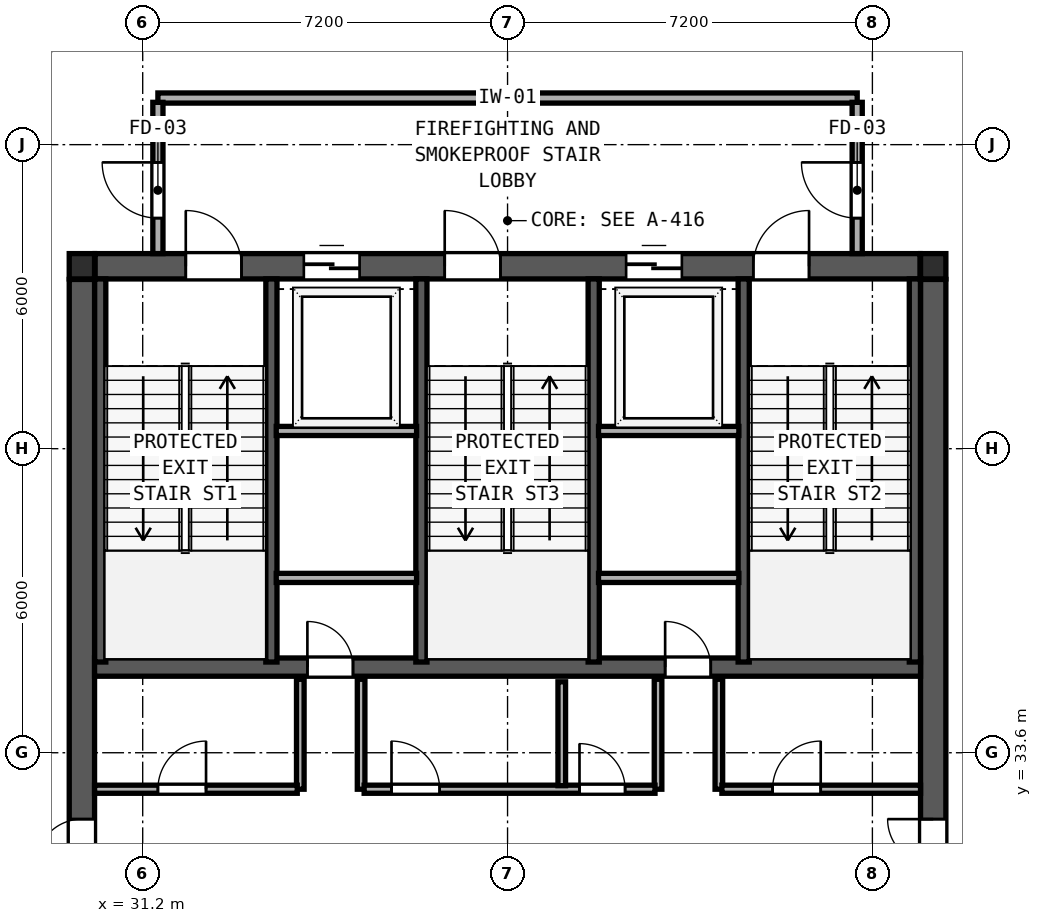
"""IFC4 building model, lengths in metres.
Left out: names, types, materials, properties, quantities, classifications, styles, units other than length and angle.
Written with IfcOpenShell. Run it as: python <this file> out.ifc"""

import sys

from ifc_helpers import new_model, si_unit, direction, frame, frame_2d, origin, origin_2d, place, context, subcontext, project, spatial, rectangle, hollow_rectangle, extrude, element, fill, save


model = new_model("IFC4")
c1 = context("Model", 3, precision=1e-05, world=origin(), true_north=direction((0.0, 1.0)))
c2 = subcontext(c1, "Body", "Model", "MODEL_VIEW")
j1 = project(units=[si_unit("LENGTHUNIT", "METRE"), si_unit("PLANEANGLEUNIT", "RADIAN")], contexts=[c1])
p1 = place(None, origin())
s1 = spatial("IfcSite", under=j1, at=p1, CompositionType="ELEMENT")
p2 = place(p1, origin())
s2 = spatial("IfcBuilding", under=s1, at=p2, CompositionType="ELEMENT")
p3 = place(p2, frame((0.0, 0.0, 328.2)))
s3 = spatial("IfcBuildingStorey", under=s2, at=p3, CompositionType="ELEMENT", Elevation=328.2)
p4 = place(p3, frame((30.26, 43.2, 0.0), z_axis=(0.0, 0.0, 1.0), x_axis=(1.0, 0.0, 0.0)))
e1 = element("IfcWall", 1, at=p4, inside=s3, PredefinedType="SHEAR", context=c2, shape_type="SweptSolid", body=[
    extrude(rectangle(XDim=16.28, YDim=0.5, at=frame_2d((8.14, 0.0))), origin(), (0.0, 0.0, 1.0), 4.55),
])
p5 = place(p4, frame((1.79, 0.0, 0.0)))
e2 = element("IfcOpeningElement", 2, at=p5, cuts=e1, PredefinedType="OPENING", context=c2, shape_type="SweptSolid", body=[
    extrude(rectangle(XDim=1.1, YDim=2.15, at=frame_2d((0.55, 1.075))), frame((0.0, 0.26, 0.0), z_axis=(0.0, -1.0, 0.0), x_axis=(1.0, 0.0, 0.0)), (0.0, 0.0, 1.0), 0.52),
])
p6 = place(p4, frame((6.9, 0.0, 0.0)))
e3 = element("IfcOpeningElement", 3, at=p6, cuts=e1, PredefinedType="OPENING", context=c2, shape_type="SweptSolid", body=[
    extrude(rectangle(XDim=1.1, YDim=2.15, at=frame_2d((0.55, 1.075))), frame((0.0, 0.26, 0.0), z_axis=(0.0, -1.0, 0.0), x_axis=(1.0, 0.0, 0.0)), (0.0, 0.0, 1.0), 0.52),
])
p7 = place(p4, frame((12.99, 0.0, 0.0)))
e4 = element("IfcOpeningElement", 4, at=p7, cuts=e1, PredefinedType="OPENING", context=c2, shape_type="SweptSolid", body=[
    extrude(rectangle(XDim=1.1, YDim=2.15, at=frame_2d((0.55, 1.075))), frame((0.0, 0.26, 0.0), z_axis=(0.0, -1.0, 0.0), x_axis=(1.0, 0.0, 0.0)), (0.0, 0.0, 1.0), 0.52),
])
p8 = place(p4, frame((4.12, 0.0, 0.0)))
e5 = element("IfcOpeningElement", 5, at=p8, cuts=e1, PredefinedType="OPENING", context=c2, shape_type="SweptSolid", body=[
    extrude(rectangle(XDim=1.1, YDim=2.2, at=frame_2d((0.55, 1.1))), frame((0.0, 0.26, 0.0), z_axis=(0.0, -1.0, 0.0), x_axis=(1.0, 0.0, 0.0)), (0.0, 0.0, 1.0), 0.52),
])
p9 = place(p4, frame((10.48, 0.0, 0.0)))
e6 = element("IfcOpeningElement", 6, at=p9, cuts=e1, PredefinedType="OPENING", context=c2, shape_type="SweptSolid", body=[
    extrude(rectangle(XDim=1.1, YDim=2.2, at=frame_2d((0.55, 1.1))), frame((0.0, 0.26, 0.0), z_axis=(0.0, -1.0, 0.0), x_axis=(1.0, 0.0, 0.0)), (0.0, 0.0, 1.0), 0.52),
])
p10 = place(p3, frame((30.0, 26.66, 0.0), z_axis=(0.0, 0.0, 1.0), x_axis=(0.0, 1.0, 0.0)))
e7 = element("IfcWall", 7, at=p10, inside=s3, PredefinedType="SHEAR", context=c2, shape_type="SweptSolid", body=[
    extrude(rectangle(XDim=16.28, YDim=0.5, at=frame_2d((8.14, 0.0))), origin(), (0.0, 0.0, 1.0), 4.55),
])
p11 = place(p10, frame((4.73, 0.0, 0.0)))
e8 = element("IfcOpeningElement", 8, at=p11, cuts=e7, PredefinedType="OPENING", context=c2, shape_type="SweptSolid", body=[
    extrude(rectangle(XDim=0.9, YDim=2.1, at=frame_2d((0.45, 1.05))), frame((0.0, 0.26, 0.0), z_axis=(0.0, -1.0, 0.0), x_axis=(1.0, 0.0, 0.0)), (0.0, 0.0, 1.0), 0.52),
])
p12 = place(p3, frame((46.8, 26.66, 0.0), z_axis=(0.0, 0.0, 1.0), x_axis=(0.0, 1.0, 0.0)))
e9 = element("IfcWall", 9, at=p12, inside=s3, PredefinedType="SHEAR", context=c2, shape_type="SweptSolid", body=[
    extrude(rectangle(XDim=16.28, YDim=0.5, at=frame_2d((8.14, 0.0))), origin(), (0.0, 0.0, 1.0), 4.55),
])
p13 = place(p12, frame((5.63, 0.0, 0.0), z_axis=(0.0, 0.0, 1.0), x_axis=(-1.0, 0.0, 0.0)))
e10 = element("IfcOpeningElement", 10, at=p13, cuts=e9, PredefinedType="OPENING", context=c2, shape_type="SweptSolid", body=[
    extrude(rectangle(XDim=0.9, YDim=2.1, at=frame_2d((0.45, 1.05))), frame((0.0, 0.26, 0.0), z_axis=(0.0, -1.0, 0.0), x_axis=(1.0, 0.0, 0.0)), (0.0, 0.0, 1.0), 0.52),
])
p14 = place(p12, frame((1.45, 0.0, 0.0), z_axis=(0.0, 0.0, 1.0), x_axis=(-1.0, 0.0, 0.0)))
e11 = element("IfcOpeningElement", 11, at=p14, cuts=e9, PredefinedType="OPENING", context=c2, shape_type="SweptSolid", body=[
    extrude(rectangle(XDim=0.9, YDim=2.1, at=frame_2d((0.45, 1.05))), frame((0.0, 0.26, 0.0), z_axis=(0.0, -1.0, 0.0), x_axis=(1.0, 0.0, 0.0)), (0.0, 0.0, 1.0), 0.52),
])
p15 = place(p3, frame((30.25, 35.29, 0.0), z_axis=(0.0, 0.0, 1.0), x_axis=(1.0, 0.0, 0.0)))
e12 = element("IfcWall", 12, at=p15, inside=s3, PredefinedType="SHEAR", context=c2, shape_type="SweptSolid", body=[
    extrude(rectangle(XDim=16.3, YDim=0.36, at=frame_2d((8.15, 0.0))), origin(), (0.0, 0.0, 1.0), 4.55),
])
p16 = place(p15, frame((5.1, 0.0, 0.0), z_axis=(0.0, 0.0, 1.0), x_axis=(-1.0, 0.0, 0.0)))
e13 = element("IfcOpeningElement", 13, at=p16, cuts=e12, PredefinedType="OPENING", context=c2, shape_type="SweptSolid", body=[
    extrude(rectangle(XDim=0.9, YDim=2.1, at=frame_2d((0.45, 1.05))), frame((0.0, 0.19, 0.0), z_axis=(0.0, -1.0, 0.0), x_axis=(1.0, 0.0, 0.0)), (0.0, 0.0, 1.0), 0.38),
])
p17 = place(p15, frame((12.16, 0.0, 0.0), z_axis=(0.0, 0.0, 1.0), x_axis=(-1.0, 0.0, 0.0)))
e14 = element("IfcOpeningElement", 14, at=p17, cuts=e12, PredefinedType="OPENING", context=c2, shape_type="SweptSolid", body=[
    extrude(rectangle(XDim=0.9, YDim=2.1, at=frame_2d((0.45, 1.05))), frame((0.0, 0.19, 0.0), z_axis=(0.0, -1.0, 0.0), x_axis=(1.0, 0.0, 0.0)), (0.0, 0.0, 1.0), 0.38),
])
for number, where, z_axis, x_axis in (
    (15, (30.362, 35.39, 0.0), (0.0, 0.0, 1.0), (0.0, 1.0, 0.0)),
    (16, (33.74, 35.39, 0.0), (0.0, 0.0, 1.0), (0.0, 1.0, 0.0)),
    (17, (36.7, 35.39, 0.0), (0.0, 0.0, 1.0), (0.0, 1.0, 0.0)),
    (18, (40.1, 35.39, 0.0), (0.0, 0.0, 1.0), (0.0, 1.0, 0.0)),
    (19, (43.06, 35.39, 0.0), (0.0, 0.0, 1.0), (0.0, 1.0, 0.0)),
    (20, (46.438, 35.39, 0.0), (0.0, 0.0, 1.0), (0.0, 1.0, 0.0)),
):
    element("IfcWall", number, at=place(p3, frame(where, z_axis=z_axis, x_axis=x_axis)), inside=s3, PredefinedType="SHEAR", context=c2, shape_type="SweptSolid", body=[
        extrude(rectangle(XDim=7.56, YDim=0.22, at=frame_2d((3.78, 0.0))), origin(), (0.0, 0.0, 1.0), 4.55),
    ])
for number, where, z_axis, x_axis in (
    (21, (30.0, 43.2, 0.0), (0.0, 0.0, 1.0), (1.0, 0.0, 0.0)),
    (22, (46.8, 43.2, 0.0), (0.0, 0.0, 1.0), (1.0, 0.0, 0.0)),
):
    element("IfcColumn", number, at=place(p3, frame(where, z_axis=z_axis, x_axis=x_axis)), inside=s3, PredefinedType="COLUMN", context=c2, shape_type="SweptSolid", body=[
        extrude(hollow_rectangle(XDim=0.5, YDim=0.5, WallThickness=0.02, at=origin_2d()), origin(), (0.0, 0.0, 1.0), 4.8),
    ])
p18 = place(p3, frame((32.098, 49.636, 0.0), z_axis=(0.0, 0.0, 1.0), x_axis=(-0.800012904983, -0.59998279297, 0.0)))
e23 = element("IfcWall", 23, at=p18, inside=s3, PredefinedType="SOLIDWALL", context=c2, shape_type="SweptSolid", body=[
    extrude(rectangle(XDim=4.54, YDim=0.22, at=frame_2d((2.27, 0.0))), origin(), (0.0, 0.0, 1.0), 4.55),
])
p19 = place(p3, frame((31.5, 46.52, 0.0), z_axis=(0.0, 0.0, 1.0), x_axis=(1.0, 0.0, 0.0)))
e24 = element("IfcWall", 24, at=p19, inside=s3, PredefinedType="SOLIDWALL", context=c2, shape_type="SweptSolid", body=[
    extrude(rectangle(XDim=13.8, YDim=0.2, at=frame_2d((6.9, 0.0))), origin(), (0.0, 0.0, 1.0), 4.55),
])
p20 = place(p3, frame((31.5, 43.45, 0.0), z_axis=(0.0, 0.0, 1.0), x_axis=(0.0, 1.0, 0.0)))
e25 = element("IfcWall", 25, at=p20, inside=s3, PredefinedType="SOLIDWALL", context=c2, shape_type="SweptSolid", body=[
    extrude(rectangle(XDim=2.985, YDim=0.2, at=frame_2d((1.493, 0.0))), origin(), (0.0, 0.0, 1.0), 4.55),
])
p21 = place(p20, frame((1.8, 0.0, 0.0), z_axis=(0.0, 0.0, 1.0), x_axis=(-1.0, 0.0, 0.0)))
e26 = element("IfcOpeningElement", 26, at=p21, cuts=e25, PredefinedType="OPENING", context=c2, shape_type="SweptSolid", body=[
    extrude(rectangle(XDim=1.1, YDim=2.15, at=frame_2d((0.55, 1.075))), frame((0.0, 0.11, 0.0), z_axis=(0.0, -1.0, 0.0), x_axis=(1.0, 0.0, 0.0)), (0.0, 0.0, 1.0), 0.22),
])
p22 = place(p3, frame((45.3, 43.45, 0.0), z_axis=(0.0, 0.0, 1.0), x_axis=(0.0, 1.0, 0.0)))
e27 = element("IfcWall", 27, at=p22, inside=s3, PredefinedType="SOLIDWALL", context=c2, shape_type="SweptSolid", body=[
    extrude(rectangle(XDim=2.985, YDim=0.2, at=frame_2d((1.493, 0.0))), origin(), (0.0, 0.0, 1.0), 4.55),
])
p23 = place(p22, frame((0.7, 0.0, 0.0)))
e28 = element("IfcOpeningElement", 28, at=p23, cuts=e27, PredefinedType="OPENING", context=c2, shape_type="SweptSolid", body=[
    extrude(rectangle(XDim=1.1, YDim=2.15, at=frame_2d((0.55, 1.075))), frame((0.0, 0.11, 0.0), z_axis=(0.0, -1.0, 0.0), x_axis=(1.0, 0.0, 0.0)), (0.0, 0.0, 1.0), 0.22),
])
for number, where, z_axis, x_axis in (
    (29, (33.835, 39.95, 0.0), (0.0, 0.0, 1.0), (1.0, 0.0, 0.0)),
    (30, (40.195, 39.95, 0.0), (0.0, 0.0, 1.0), (1.0, 0.0, 0.0)),
    (31, (33.835, 37.05, 0.0), (0.0, 0.0, 1.0), (1.0, 0.0, 0.0)),
):
    element("IfcWall", number, at=place(p3, frame(where, z_axis=z_axis, x_axis=x_axis)), inside=s3, PredefinedType="SOLIDWALL", context=c2, shape_type="SweptSolid", body=[
        extrude(rectangle(XDim=2.77, YDim=0.18, at=frame_2d((1.385, 0.0))), origin(), (0.0, 0.0, 1.0), 4.55),
    ])
for number, where, z_axis, x_axis in (
    (32, (34.31, 32.88, 0.0), (0.0, 0.0, 1.0), (0.0, 1.0, 0.0)),
    (33, (35.51, 32.88, 0.0), (0.0, 0.0, 1.0), (0.0, 1.0, 0.0)),
):
    element("IfcWall", number, at=place(p3, frame(where, z_axis=z_axis, x_axis=x_axis)), inside=s3, PredefinedType="SOLIDWALL", context=c2, shape_type="SweptSolid", body=[
        extrude(rectangle(XDim=2.17, YDim=0.15, at=frame_2d((1.085, 0.0))), origin(), (0.0, 0.0, 1.0), 4.55),
    ])
p24 = place(p3, frame((40.195, 37.05, 0.0), z_axis=(0.0, 0.0, 1.0), x_axis=(1.0, 0.0, 0.0)))
e34 = element("IfcWall", 34, at=p24, inside=s3, PredefinedType="SOLIDWALL", context=c2, shape_type="SweptSolid", body=[
    extrude(rectangle(XDim=2.77, YDim=0.18, at=frame_2d((1.385, 0.0))), origin(), (0.0, 0.0, 1.0), 4.55),
])
for number, where, z_axis, x_axis in (
    (35, (41.37, 32.88, 0.0), (0.0, 0.0, 1.0), (0.0, 1.0, 0.0)),
    (36, (42.57, 32.88, 0.0), (0.0, 0.0, 1.0), (0.0, 1.0, 0.0)),
):
    element("IfcWall", number, at=place(p3, frame(where, z_axis=z_axis, x_axis=x_axis)), inside=s3, PredefinedType="SOLIDWALL", context=c2, shape_type="SweptSolid", body=[
        extrude(rectangle(XDim=2.17, YDim=0.15, at=frame_2d((1.085, 0.0))), origin(), (0.0, 0.0, 1.0), 4.55),
    ])
p25 = place(p3, frame((30.25, 32.88, 0.0), z_axis=(0.0, 0.0, 1.0), x_axis=(1.0, 0.0, 0.0)))
e37 = element("IfcWall", 37, at=p25, inside=s3, PredefinedType="SOLIDWALL", context=c2, shape_type="SweptSolid", body=[
    extrude(rectangle(XDim=4.0, YDim=0.16, at=frame_2d((2.0, 0.0))), origin(), (0.0, 0.0, 1.0), 4.55),
])
p26 = place(p25, frame((2.2, 0.0, 0.0), z_axis=(0.0, 0.0, 1.0), x_axis=(-1.0, 0.0, 0.0)))
e38 = element("IfcOpeningElement", 38, at=p26, cuts=e37, PredefinedType="OPENING", context=c2, shape_type="SweptSolid", body=[
    extrude(rectangle(XDim=0.95, YDim=2.12, at=frame_2d((0.475, 1.06))), frame((0.0, 0.09, 0.0), z_axis=(0.0, -1.0, 0.0), x_axis=(1.0, 0.0, 0.0)), (0.0, 0.0, 1.0), 0.18),
])
p27 = place(p3, frame((35.57, 32.88, 0.0), z_axis=(0.0, 0.0, 1.0), x_axis=(1.0, 0.0, 0.0)))
e39 = element("IfcWall", 39, at=p27, inside=s3, PredefinedType="SOLIDWALL", context=c2, shape_type="SweptSolid", body=[
    extrude(rectangle(XDim=5.74, YDim=0.16, at=frame_2d((2.87, 0.0))), origin(), (0.0, 0.0, 1.0), 4.55),
])
p28 = place(p27, frame((1.49, 0.0, 0.0), z_axis=(0.0, 0.0, 1.0), x_axis=(-1.0, 0.0, 0.0)))
e40 = element("IfcOpeningElement", 40, at=p28, cuts=e39, PredefinedType="OPENING", context=c2, shape_type="SweptSolid", body=[
    extrude(rectangle(XDim=0.95, YDim=2.12, at=frame_2d((0.475, 1.06))), frame((0.0, 0.09, 0.0), z_axis=(0.0, -1.0, 0.0), x_axis=(1.0, 0.0, 0.0)), (0.0, 0.0, 1.0), 0.18),
])
p29 = place(p27, frame((5.15, 0.0, 0.0), z_axis=(0.0, 0.0, 1.0), x_axis=(-1.0, 0.0, 0.0)))
e41 = element("IfcOpeningElement", 41, at=p29, cuts=e39, PredefinedType="OPENING", context=c2, shape_type="SweptSolid", body=[
    extrude(rectangle(XDim=0.9, YDim=2.1, at=frame_2d((0.45, 1.05))), frame((0.0, 0.09, 0.0), z_axis=(0.0, -1.0, 0.0), x_axis=(1.0, 0.0, 0.0)), (0.0, 0.0, 1.0), 0.18),
])
p30 = place(p3, frame((42.63, 32.88, 0.0), z_axis=(0.0, 0.0, 1.0), x_axis=(1.0, 0.0, 0.0)))
e42 = element("IfcWall", 42, at=p30, inside=s3, PredefinedType="SOLIDWALL", context=c2, shape_type="SweptSolid", body=[
    extrude(rectangle(XDim=3.92, YDim=0.16, at=frame_2d((1.96, 0.0))), origin(), (0.0, 0.0, 1.0), 4.55),
])
p31 = place(p30, frame((1.95, 0.0, 0.0), z_axis=(0.0, 0.0, 1.0), x_axis=(-1.0, 0.0, 0.0)))
e43 = element("IfcOpeningElement", 43, at=p31, cuts=e42, PredefinedType="OPENING", context=c2, shape_type="SweptSolid", body=[
    extrude(rectangle(XDim=0.95, YDim=2.12, at=frame_2d((0.475, 1.06))), frame((0.0, 0.09, 0.0), z_axis=(0.0, -1.0, 0.0), x_axis=(1.0, 0.0, 0.0)), (0.0, 0.0, 1.0), 0.18),
])
p32 = place(p3, frame((39.47, 32.95, 0.0), z_axis=(0.0, 0.0, 1.0), x_axis=(0.0, 1.0, 0.0)))
e44 = element("IfcWall", 44, at=p32, inside=s3, PredefinedType="SOLIDWALL", context=c2, shape_type="SweptSolid", body=[
    extrude(rectangle(XDim=2.05, YDim=0.15, at=frame_2d((1.025, 0.0))), origin(), (0.0, 0.0, 1.0), 4.55),
])
p33 = place(p5, origin())
e45 = element("IfcDoor", 45, at=p33, inside=s3, OperationType="SINGLE_SWING_LEFT", PredefinedType="DOOR", context=c2, shape_type="SweptSolid", body=[
    extrude(rectangle(XDim=1.1, YDim=2.15, at=frame_2d((0.55, 1.075))), frame((0.0, 0.185, 0.0), z_axis=(0.0, -1.0, 0.0), x_axis=(1.0, 0.0, 0.0)), (0.0, 0.0, 1.0), 0.05),
])
fill(e2, e45)
p34 = place(p6, origin())
e46 = element("IfcDoor", 46, at=p34, inside=s3, OperationType="SINGLE_SWING_LEFT", PredefinedType="DOOR", context=c2, shape_type="SweptSolid", body=[
    extrude(rectangle(XDim=1.1, YDim=2.15, at=frame_2d((0.55, 1.075))), frame((0.0, 0.185, 0.0), z_axis=(0.0, -1.0, 0.0), x_axis=(1.0, 0.0, 0.0)), (0.0, 0.0, 1.0), 0.05),
])
fill(e3, e46)
p35 = place(p7, origin())
e47 = element("IfcDoor", 47, at=p35, inside=s3, OperationType="SINGLE_SWING_RIGHT", PredefinedType="DOOR", context=c2, shape_type="SweptSolid", body=[
    extrude(rectangle(XDim=1.1, YDim=2.15, at=frame_2d((0.55, 1.075))), frame((0.0, 0.185, 0.0), z_axis=(0.0, -1.0, 0.0), x_axis=(1.0, 0.0, 0.0)), (0.0, 0.0, 1.0), 0.05),
])
fill(e4, e47)
p36 = place(p21, origin())
e48 = element("IfcDoor", 48, at=p36, inside=s3, OperationType="SINGLE_SWING_LEFT", PredefinedType="DOOR", context=c2, shape_type="SweptSolid", body=[
    extrude(rectangle(XDim=1.1, YDim=2.15, at=frame_2d((0.55, 1.075))), frame((0.0, 0.025, 0.0), z_axis=(0.0, -1.0, 0.0), x_axis=(1.0, 0.0, 0.0)), (0.0, 0.0, 1.0), 0.05),
])
fill(e26, e48)
p37 = place(p23, origin())
e49 = element("IfcDoor", 49, at=p37, inside=s3, OperationType="SINGLE_SWING_RIGHT", PredefinedType="DOOR", context=c2, shape_type="SweptSolid", body=[
    extrude(rectangle(XDim=1.1, YDim=2.15, at=frame_2d((0.55, 1.075))), frame((0.0, 0.025, 0.0), z_axis=(0.0, -1.0, 0.0), x_axis=(1.0, 0.0, 0.0)), (0.0, 0.0, 1.0), 0.05),
])
fill(e28, e49)
p38 = place(p8, origin())
e50 = element("IfcDoor", 50, at=p38, inside=s3, OperationType="SLIDING_TO_LEFT", PredefinedType="DOOR", context=c2, shape_type="SweptSolid", body=[
    extrude(rectangle(XDim=1.1, YDim=2.2, at=frame_2d((0.55, 1.1))), frame((0.0, 0.185, 0.0), z_axis=(0.0, -1.0, 0.0), x_axis=(1.0, 0.0, 0.0)), (0.0, 0.0, 1.0), 0.05),
])
fill(e5, e50)
p39 = place(p9, origin())
e51 = element("IfcDoor", 51, at=p39, inside=s3, OperationType="SLIDING_TO_LEFT", PredefinedType="DOOR", context=c2, shape_type="SweptSolid", body=[
    extrude(rectangle(XDim=1.1, YDim=2.2, at=frame_2d((0.55, 1.1))), frame((0.0, 0.185, 0.0), z_axis=(0.0, -1.0, 0.0), x_axis=(1.0, 0.0, 0.0)), (0.0, 0.0, 1.0), 0.05),
])
fill(e6, e51)
p40 = place(p16, origin())
e52 = element("IfcDoor", 52, at=p40, inside=s3, OperationType="SINGLE_SWING_RIGHT", PredefinedType="DOOR", context=c2, shape_type="SweptSolid", body=[
    extrude(rectangle(XDim=0.9, YDim=2.1, at=frame_2d((0.45, 1.05))), frame((0.0, 0.025, 0.0), z_axis=(0.0, -1.0, 0.0), x_axis=(1.0, 0.0, 0.0)), (0.0, 0.0, 1.0), 0.05),
])
fill(e13, e52)
p41 = place(p17, origin())
e53 = element("IfcDoor", 53, at=p41, inside=s3, OperationType="SINGLE_SWING_RIGHT", PredefinedType="DOOR", context=c2, shape_type="SweptSolid", body=[
    extrude(rectangle(XDim=0.9, YDim=2.1, at=frame_2d((0.45, 1.05))), frame((0.0, 0.025, 0.0), z_axis=(0.0, -1.0, 0.0), x_axis=(1.0, 0.0, 0.0)), (0.0, 0.0, 1.0), 0.05),
])
fill(e14, e53)
p42 = place(p11, origin())
e54 = element("IfcDoor", 54, at=p42, inside=s3, OperationType="SINGLE_SWING_LEFT", PredefinedType="DOOR", context=c2, shape_type="SweptSolid", body=[
    extrude(rectangle(XDim=0.9, YDim=2.1, at=frame_2d((0.45, 1.05))), frame((0.0, 0.025, 0.0), z_axis=(0.0, -1.0, 0.0), x_axis=(1.0, 0.0, 0.0)), (0.0, 0.0, 1.0), 0.05),
])
fill(e8, e54)
p43 = place(p13, origin())
e55 = element("IfcDoor", 55, at=p43, inside=s3, OperationType="SINGLE_SWING_LEFT", PredefinedType="DOOR", context=c2, shape_type="SweptSolid", body=[
    extrude(rectangle(XDim=0.9, YDim=2.1, at=frame_2d((0.45, 1.05))), frame((0.0, 0.025, 0.0), z_axis=(0.0, -1.0, 0.0), x_axis=(1.0, 0.0, 0.0)), (0.0, 0.0, 1.0), 0.05),
])
fill(e10, e55)
p44 = place(p26, origin())
e56 = element("IfcDoor", 56, at=p44, inside=s3, OperationType="SINGLE_SWING_LEFT", PredefinedType="DOOR", context=c2, shape_type="SweptSolid", body=[
    extrude(rectangle(XDim=0.95, YDim=2.12, at=frame_2d((0.475, 1.06))), frame((0.0, 0.025, 0.0), z_axis=(0.0, -1.0, 0.0), x_axis=(1.0, 0.0, 0.0)), (0.0, 0.0, 1.0), 0.05),
])
fill(e38, e56)
p45 = place(p28, origin())
e57 = element("IfcDoor", 57, at=p45, inside=s3, OperationType="SINGLE_SWING_RIGHT", PredefinedType="DOOR", context=c2, shape_type="SweptSolid", body=[
    extrude(rectangle(XDim=0.95, YDim=2.12, at=frame_2d((0.475, 1.06))), frame((0.0, 0.025, 0.0), z_axis=(0.0, -1.0, 0.0), x_axis=(1.0, 0.0, 0.0)), (0.0, 0.0, 1.0), 0.05),
])
fill(e40, e57)
p46 = place(p29, origin())
e58 = element("IfcDoor", 58, at=p46, inside=s3, OperationType="SINGLE_SWING_RIGHT", PredefinedType="DOOR", context=c2, shape_type="SweptSolid", body=[
    extrude(rectangle(XDim=0.9, YDim=2.1, at=frame_2d((0.45, 1.05))), frame((0.0, 0.025, 0.0), z_axis=(0.0, -1.0, 0.0), x_axis=(1.0, 0.0, 0.0)), (0.0, 0.0, 1.0), 0.05),
])
fill(e41, e58)
p47 = place(p31, origin())
e59 = element("IfcDoor", 59, at=p47, inside=s3, OperationType="SINGLE_SWING_LEFT", PredefinedType="DOOR", context=c2, shape_type="SweptSolid", body=[
    extrude(rectangle(XDim=0.95, YDim=2.12, at=frame_2d((0.475, 1.06))), frame((0.0, 0.025, 0.0), z_axis=(0.0, -1.0, 0.0), x_axis=(1.0, 0.0, 0.0)), (0.0, 0.0, 1.0), 0.05),
])
fill(e43, e59)
save(model, sys.argv[1])
